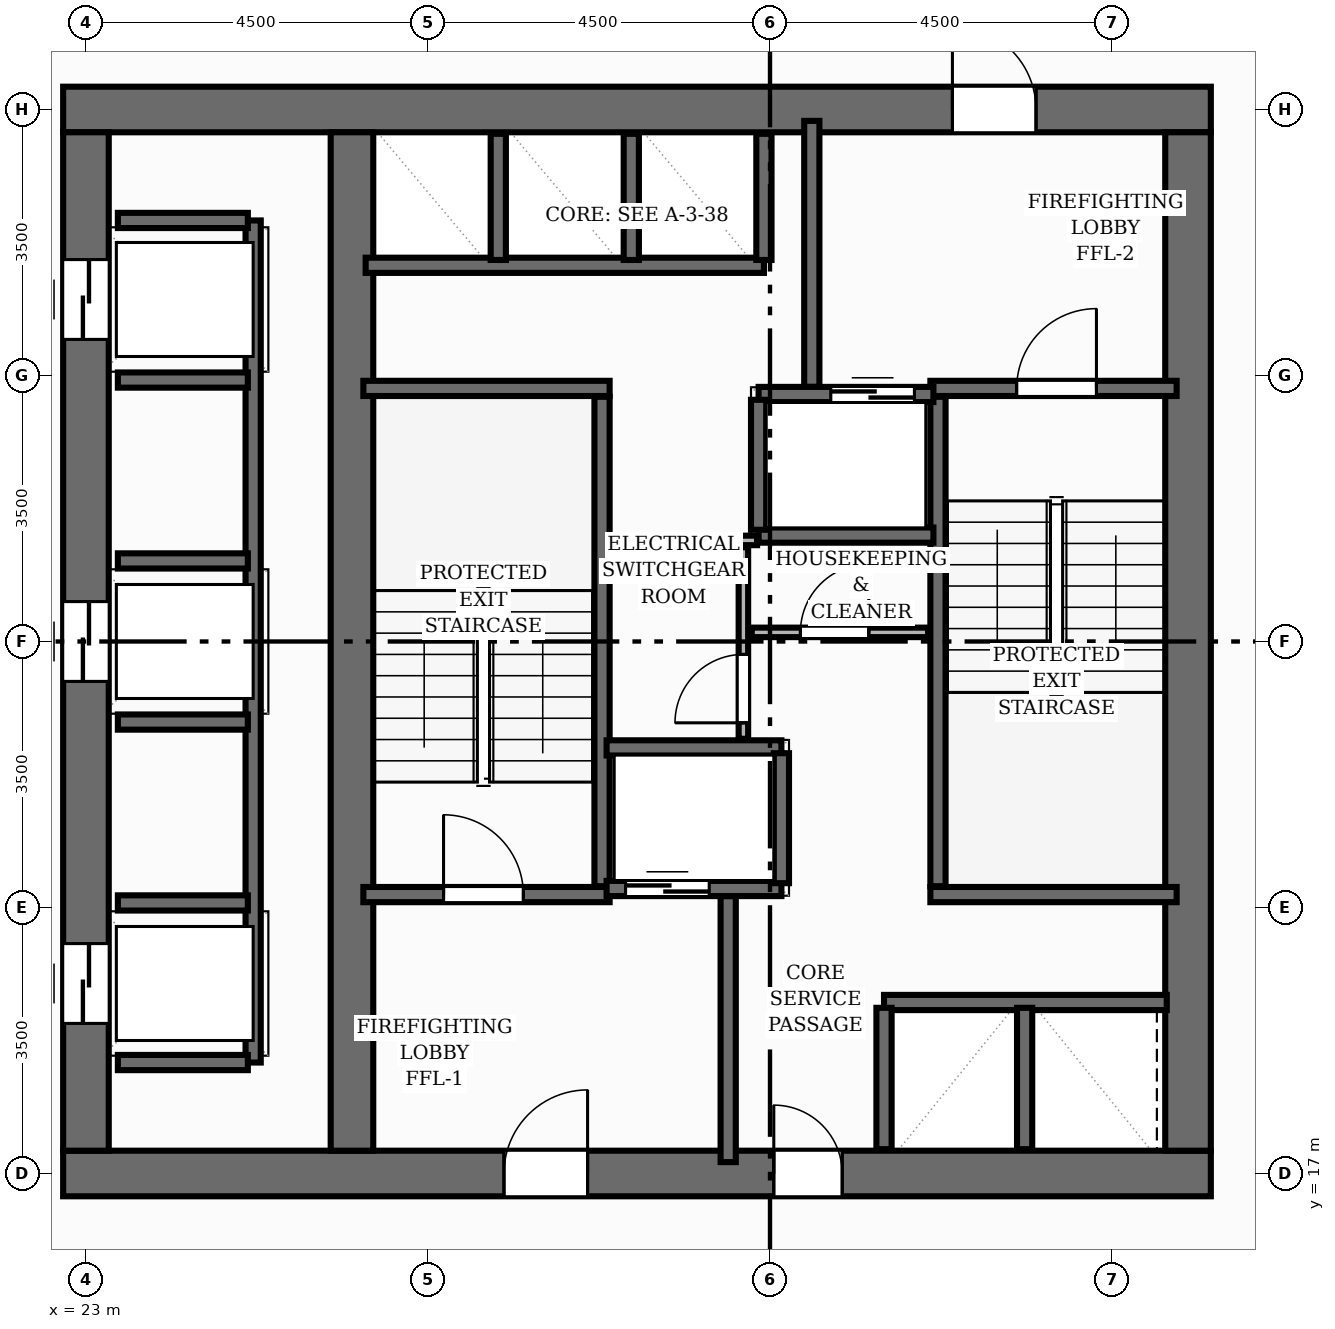
"""IFC4 building model, lengths in metres.
Left out: names, types, materials, properties, quantities, classifications, styles, units other than length and angle.
Written with IfcOpenShell. Run it as: python <this file> out.ifc"""

import sys

from ifc_helpers import new_model, si_unit, direction, frame, frame_2d, origin, place, context, subcontext, project, spatial, rectangle, extrude, element, fill, save


model = new_model("IFC4")
c1 = context("Model", 3, precision=1e-05, world=origin(), true_north=direction((0.0, 1.0)))
c2 = subcontext(c1, "Body", "Model", "MODEL_VIEW")
j1 = project(units=[si_unit("LENGTHUNIT", "METRE"), si_unit("PLANEANGLEUNIT", "RADIAN")], contexts=[c1])
p1 = place(None, origin())
s1 = spatial("IfcSite", under=j1, at=p1, CompositionType="ELEMENT")
p2 = place(p1, origin())
s2 = spatial("IfcBuilding", under=s1, at=p2, CompositionType="ELEMENT")
p3 = place(p2, frame((0.0, 0.0, 155.36)))
s3 = spatial("IfcBuildingStorey", under=s2, at=p3, CompositionType="ELEMENT", Elevation=155.36)
p4 = place(p3, frame((22.7, 17.0, 0.0), z_axis=(0.0, 0.0, 1.0), x_axis=(1.0, 0.0, 0.0)))
e1 = element("IfcWall", 1, at=p4, inside=s3, PredefinedType="SHEAR", context=c2, shape_type="SweptSolid", body=[
    extrude(rectangle(XDim=15.1, YDim=0.6, at=frame_2d((7.55, 0.0))), origin(), (0.0, 0.0, 1.0), 3.2),
])
p5 = place(p4, frame((5.8, 0.0, 0.0)))
e2 = element("IfcOpeningElement", 2, at=p5, cuts=e1, PredefinedType="OPENING", context=c2, shape_type="SweptSolid", body=[
    extrude(rectangle(XDim=1.1, YDim=2.15, at=frame_2d((0.55, 1.075))), frame((0.0, 0.31, 0.0), z_axis=(0.0, -1.0, 0.0), x_axis=(1.0, 0.0, 0.0)), (0.0, 0.0, 1.0), 0.62),
])
p6 = place(p4, frame((9.35, 0.0, 0.0)))
e3 = element("IfcOpeningElement", 3, at=p6, cuts=e1, PredefinedType="OPENING", context=c2, shape_type="SweptSolid", body=[
    extrude(rectangle(XDim=0.9, YDim=2.1, at=frame_2d((0.45, 1.05))), frame((0.0, 0.31, 0.0), z_axis=(0.0, -1.0, 0.0), x_axis=(1.0, 0.0, 0.0)), (0.0, 0.0, 1.0), 0.62),
])
p7 = place(p3, frame((22.7, 31.0, 0.0), z_axis=(0.0, 0.0, 1.0), x_axis=(1.0, 0.0, 0.0)))
e4 = element("IfcWall", 4, at=p7, inside=s3, PredefinedType="SHEAR", context=c2, shape_type="SweptSolid", body=[
    extrude(rectangle(XDim=15.1, YDim=0.6, at=frame_2d((7.55, 0.0))), origin(), (0.0, 0.0, 1.0), 3.2),
])
p8 = place(p7, frame((11.7, 0.0, 0.0)))
e5 = element("IfcOpeningElement", 5, at=p8, cuts=e4, PredefinedType="OPENING", context=c2, shape_type="SweptSolid", body=[
    extrude(rectangle(XDim=1.1, YDim=2.15, at=frame_2d((0.55, 1.075))), frame((0.0, 0.31, 0.0), z_axis=(0.0, -1.0, 0.0), x_axis=(1.0, 0.0, 0.0)), (0.0, 0.0, 1.0), 0.62),
])
p9 = place(p3, frame((23.0, 17.3, 0.0), z_axis=(0.0, 0.0, 1.0), x_axis=(0.0, 1.0, 0.0)))
e6 = element("IfcWall", 6, at=p9, inside=s3, PredefinedType="SHEAR", context=c2, shape_type="SweptSolid", body=[
    extrude(rectangle(XDim=13.4, YDim=0.6, at=frame_2d((6.7, 0.0))), origin(), (0.0, 0.0, 1.0), 3.2),
])
p10 = place(p9, frame((1.675, 0.0, 0.0)))
e7 = element("IfcOpeningElement", 7, at=p10, cuts=e6, PredefinedType="OPENING", context=c2, shape_type="SweptSolid", body=[
    extrude(rectangle(XDim=1.05, YDim=2.15, at=frame_2d((0.525, 1.075))), frame((0.0, 0.31, 0.0), z_axis=(0.0, -1.0, 0.0), x_axis=(1.0, 0.0, 0.0)), (0.0, 0.0, 1.0), 0.62),
])
p11 = place(p9, frame((6.175, 0.0, 0.0)))
e8 = element("IfcOpeningElement", 8, at=p11, cuts=e6, PredefinedType="OPENING", context=c2, shape_type="SweptSolid", body=[
    extrude(rectangle(XDim=1.05, YDim=2.15, at=frame_2d((0.525, 1.075))), frame((0.0, 0.31, 0.0), z_axis=(0.0, -1.0, 0.0), x_axis=(1.0, 0.0, 0.0)), (0.0, 0.0, 1.0), 0.62),
])
p12 = place(p9, frame((10.675, 0.0, 0.0)))
e9 = element("IfcOpeningElement", 9, at=p12, cuts=e6, PredefinedType="OPENING", context=c2, shape_type="SweptSolid", body=[
    extrude(rectangle(XDim=1.05, YDim=2.15, at=frame_2d((0.525, 1.075))), frame((0.0, 0.31, 0.0), z_axis=(0.0, -1.0, 0.0), x_axis=(1.0, 0.0, 0.0)), (0.0, 0.0, 1.0), 0.62),
])
p13 = place(p3, frame((37.5, 17.3, 0.0), z_axis=(0.0, 0.0, 1.0), x_axis=(0.0, 1.0, 0.0)))
e10 = element("IfcWall", 10, at=p13, inside=s3, PredefinedType="SHEAR", context=c2, shape_type="SweptSolid", body=[
    extrude(rectangle(XDim=13.4, YDim=0.6, at=frame_2d((6.7, 0.0))), origin(), (0.0, 0.0, 1.0), 3.2),
])
p14 = place(p3, frame((26.5, 17.3, 0.0), z_axis=(0.0, 0.0, 1.0), x_axis=(0.0, 1.0, 0.0)))
e11 = element("IfcWall", 11, at=p14, inside=s3, PredefinedType="SHEAR", context=c2, shape_type="SweptSolid", body=[
    extrude(rectangle(XDim=13.4, YDim=0.56, at=frame_2d((6.7, 0.0))), origin(), (0.0, 0.0, 1.0), 3.2),
])
p15 = place(p3, frame((29.79, 20.78, 0.0), z_axis=(0.0, 0.0, 1.0), x_axis=(0.0, 1.0, 0.0)))
e12 = element("IfcWall", 12, at=p15, inside=s3, PredefinedType="SHEAR", context=c2, shape_type="SweptSolid", body=[
    extrude(rectangle(XDim=6.44, YDim=0.2, at=frame_2d((3.22, 0.0))), origin(), (0.0, 0.0, 1.0), 3.2),
])
p16 = place(p3, frame((26.65, 27.33, 0.0), z_axis=(0.0, 0.0, 1.0), x_axis=(1.0, 0.0, 0.0)))
e13 = element("IfcWall", 13, at=p16, inside=s3, PredefinedType="SHEAR", context=c2, shape_type="SweptSolid", body=[
    extrude(rectangle(XDim=3.24, YDim=0.2, at=frame_2d((1.62, 0.0))), origin(), (0.0, 0.0, 1.0), 3.2),
])
p17 = place(p3, frame((26.65, 20.67, 0.0), z_axis=(0.0, 0.0, 1.0), x_axis=(1.0, 0.0, 0.0)))
e14 = element("IfcWall", 14, at=p17, inside=s3, PredefinedType="SHEAR", context=c2, shape_type="SweptSolid", body=[
    extrude(rectangle(XDim=3.24, YDim=0.2, at=frame_2d((1.62, 0.0))), origin(), (0.0, 0.0, 1.0), 3.2),
])
p18 = place(p17, frame((1.055, 0.0, 0.0)))
e15 = element("IfcOpeningElement", 15, at=p18, cuts=e14, PredefinedType="OPENING", context=c2, shape_type="SweptSolid", body=[
    extrude(rectangle(XDim=1.05, YDim=2.15, at=frame_2d((0.525, 1.075))), frame((0.0, 0.11, 0.0), z_axis=(0.0, -1.0, 0.0), x_axis=(1.0, 0.0, 0.0)), (0.0, 0.0, 1.0), 0.22),
])
p19 = place(p3, frame((34.21, 20.78, 0.0), z_axis=(0.0, 0.0, 1.0), x_axis=(0.0, 1.0, 0.0)))
e16 = element("IfcWall", 16, at=p19, inside=s3, PredefinedType="SHEAR", context=c2, shape_type="SweptSolid", body=[
    extrude(rectangle(XDim=6.44, YDim=0.2, at=frame_2d((3.22, 0.0))), origin(), (0.0, 0.0, 1.0), 3.2),
])
p20 = place(p3, frame((34.11, 20.67, 0.0), z_axis=(0.0, 0.0, 1.0), x_axis=(1.0, 0.0, 0.0)))
e17 = element("IfcWall", 17, at=p20, inside=s3, PredefinedType="SHEAR", context=c2, shape_type="SweptSolid", body=[
    extrude(rectangle(XDim=3.24, YDim=0.2, at=frame_2d((1.62, 0.0))), origin(), (0.0, 0.0, 1.0), 3.2),
])
p21 = place(p3, frame((34.11, 27.33, 0.0), z_axis=(0.0, 0.0, 1.0), x_axis=(1.0, 0.0, 0.0)))
e18 = element("IfcWall", 18, at=p21, inside=s3, PredefinedType="SHEAR", context=c2, shape_type="SweptSolid", body=[
    extrude(rectangle(XDim=3.24, YDim=0.2, at=frame_2d((1.62, 0.0))), origin(), (0.0, 0.0, 1.0), 3.2),
])
p22 = place(p21, frame((1.135, 0.0, 0.0)))
e19 = element("IfcOpeningElement", 19, at=p22, cuts=e18, PredefinedType="OPENING", context=c2, shape_type="SweptSolid", body=[
    extrude(rectangle(XDim=1.05, YDim=2.15, at=frame_2d((0.525, 1.075))), frame((0.0, 0.11, 0.0), z_axis=(0.0, -1.0, 0.0), x_axis=(1.0, 0.0, 0.0)), (0.0, 0.0, 1.0), 0.22),
])
for number, where, z_axis, x_axis in (
    (20, (31.45, 17.15, 0.0), (0.0, 0.0, 1.0), (0.0, 1.0, 0.0)),
    (21, (32.55, 27.35, 0.0), (0.0, 0.0, 1.0), (0.0, 1.0, 0.0)),
):
    element("IfcWall", number, at=place(p3, frame(where, z_axis=z_axis, x_axis=x_axis)), inside=s3, PredefinedType="SHEAR", context=c2, shape_type="SweptSolid", body=[
        extrude(rectangle(XDim=3.5, YDim=0.2, at=frame_2d((1.75, 0.0))), origin(), (0.0, 0.0, 1.0), 3.2),
    ])
p23 = place(p3, frame((29.85, 20.75, 0.0), z_axis=(0.0, 0.0, 1.0), x_axis=(1.0, 0.0, 0.0)))
e22 = element("IfcWall", 22, at=p23, inside=s3, PredefinedType="SHEAR", context=c2, shape_type="SweptSolid", body=[
    extrude(rectangle(XDim=2.3, YDim=0.2, at=frame_2d((1.15, 0.0))), origin(), (0.0, 0.0, 1.0), 3.2),
])
p24 = place(p23, frame((0.25, 0.0, 0.0)))
e23 = element("IfcOpeningElement", 23, at=p24, cuts=e22, PredefinedType="OPENING", context=c2, shape_type="SweptSolid", body=[
    extrude(rectangle(XDim=1.1, YDim=2.15, at=frame_2d((0.55, 1.075))), frame((0.0, 0.11, 0.0), z_axis=(0.0, -1.0, 0.0), x_axis=(1.0, 0.0, 0.0)), (0.0, 0.0, 1.0), 0.22),
])
p25 = place(p3, frame((29.85, 22.6, 0.0), z_axis=(0.0, 0.0, 1.0), x_axis=(1.0, 0.0, 0.0)))
e24 = element("IfcWall", 24, at=p25, inside=s3, PredefinedType="SHEAR", context=c2, shape_type="SweptSolid", body=[
    extrude(rectangle(XDim=2.3, YDim=0.2, at=frame_2d((1.15, 0.0))), origin(), (0.0, 0.0, 1.0), 3.2),
])
p26 = place(p3, frame((32.15, 20.82, 0.0), z_axis=(0.0, 0.0, 1.0), x_axis=(0.0, 1.0, 0.0)))
e25 = element("IfcWall", 25, at=p26, inside=s3, PredefinedType="SHEAR", context=c2, shape_type="SweptSolid", body=[
    extrude(rectangle(XDim=1.71, YDim=0.2, at=frame_2d((0.855, 0.0))), origin(), (0.0, 0.0, 1.0), 3.2),
])
p27 = place(p3, frame((31.85, 27.25, 0.0), z_axis=(0.0, 0.0, 1.0), x_axis=(1.0, 0.0, 0.0)))
e26 = element("IfcWall", 26, at=p27, inside=s3, PredefinedType="SHEAR", context=c2, shape_type="SweptSolid", body=[
    extrude(rectangle(XDim=2.3, YDim=0.2, at=frame_2d((1.15, 0.0))), origin(), (0.0, 0.0, 1.0), 3.2),
])
p28 = place(p27, frame((0.95, 0.0, 0.0)))
e27 = element("IfcOpeningElement", 27, at=p28, cuts=e26, PredefinedType="OPENING", context=c2, shape_type="SweptSolid", body=[
    extrude(rectangle(XDim=1.1, YDim=2.15, at=frame_2d((0.55, 1.075))), frame((0.0, 0.11, 0.0), z_axis=(0.0, -1.0, 0.0), x_axis=(1.0, 0.0, 0.0)), (0.0, 0.0, 1.0), 0.22),
])
p29 = place(p3, frame((31.85, 25.4, 0.0), z_axis=(0.0, 0.0, 1.0), x_axis=(1.0, 0.0, 0.0)))
e28 = element("IfcWall", 28, at=p29, inside=s3, PredefinedType="SHEAR", context=c2, shape_type="SweptSolid", body=[
    extrude(rectangle(XDim=2.3, YDim=0.2, at=frame_2d((1.15, 0.0))), origin(), (0.0, 0.0, 1.0), 3.2),
])
p30 = place(p3, frame((31.85, 25.47, 0.0), z_axis=(0.0, 0.0, 1.0), x_axis=(0.0, 1.0, 0.0)))
e29 = element("IfcWall", 29, at=p30, inside=s3, PredefinedType="SHEAR", context=c2, shape_type="SweptSolid", body=[
    extrude(rectangle(XDim=1.71, YDim=0.2, at=frame_2d((0.855, 0.0))), origin(), (0.0, 0.0, 1.0), 3.2),
])
p31 = place(p3, frame((25.2, 18.46, 0.0), z_axis=(0.0, 0.0, 1.0), x_axis=(0.0, 1.0, 0.0)))
e30 = element("IfcWall", 30, at=p31, inside=s3, PredefinedType="SHEAR", context=c2, shape_type="SweptSolid", body=[
    extrude(rectangle(XDim=11.08, YDim=0.2, at=frame_2d((5.54, 0.0))), origin(), (0.0, 0.0, 1.0), 3.2),
])
for number, where, z_axis, x_axis in (
    (31, (23.42, 18.46, 0.0), (0.0, 0.0, 1.0), (1.0, 0.0, 0.0)),
    (32, (23.42, 29.54, 0.0), (0.0, 0.0, 1.0), (1.0, 0.0, 0.0)),
    (33, (23.42, 20.56, 0.0), (0.0, 0.0, 1.0), (1.0, 0.0, 0.0)),
    (34, (23.42, 22.94, 0.0), (0.0, 0.0, 1.0), (1.0, 0.0, 0.0)),
    (35, (23.42, 25.06, 0.0), (0.0, 0.0, 1.0), (1.0, 0.0, 0.0)),
    (36, (23.42, 27.44, 0.0), (0.0, 0.0, 1.0), (1.0, 0.0, 0.0)),
):
    element("IfcWall", number, at=place(p3, frame(where, z_axis=z_axis, x_axis=x_axis)), inside=s3, PredefinedType="SHEAR", context=c2, shape_type="SweptSolid", body=[
        extrude(rectangle(XDim=1.71, YDim=0.2, at=frame_2d((0.855, 0.0))), origin(), (0.0, 0.0, 1.0), 3.2),
    ])
p32 = place(p3, frame((26.68, 28.95, 0.0), z_axis=(0.0, 0.0, 1.0), x_axis=(1.0, 0.0, 0.0)))
e37 = element("IfcWall", 37, at=p32, inside=s3, PredefinedType="SHEAR", context=c2, shape_type="SweptSolid", body=[
    extrude(rectangle(XDim=5.24, YDim=0.2, at=frame_2d((2.62, 0.0))), origin(), (0.0, 0.0, 1.0), 3.2),
])
for number, where, z_axis, x_axis in (
    (38, (31.92, 29.02, 0.0), (0.0, 0.0, 1.0), (0.0, 1.0, 0.0)),
    (39, (28.425, 29.02, 0.0), (0.0, 0.0, 1.0), (0.0, 1.0, 0.0)),
    (40, (30.175, 29.02, 0.0), (0.0, 0.0, 1.0), (0.0, 1.0, 0.0)),
):
    element("IfcWall", number, at=place(p3, frame(where, z_axis=z_axis, x_axis=x_axis)), inside=s3, PredefinedType="SHEAR", context=c2, shape_type="SweptSolid", body=[
        extrude(rectangle(XDim=1.66, YDim=0.2, at=frame_2d((0.83, 0.0))), origin(), (0.0, 0.0, 1.0), 3.2),
    ])
p33 = place(p3, frame((33.5, 19.25, 0.0), z_axis=(0.0, 0.0, 1.0), x_axis=(1.0, 0.0, 0.0)))
e41 = element("IfcWall", 41, at=p33, inside=s3, PredefinedType="SHEAR", context=c2, shape_type="SweptSolid", body=[
    extrude(rectangle(XDim=3.72, YDim=0.2, at=frame_2d((1.86, 0.0))), origin(), (0.0, 0.0, 1.0), 3.2),
])
for number, where, z_axis, x_axis in (
    (42, (33.5, 17.32, 0.0), (0.0, 0.0, 1.0), (0.0, 1.0, 0.0)),
    (43, (35.35, 17.32, 0.0), (0.0, 0.0, 1.0), (0.0, 1.0, 0.0)),
):
    element("IfcWall", number, at=place(p3, frame(where, z_axis=z_axis, x_axis=x_axis)), inside=s3, PredefinedType="SHEAR", context=c2, shape_type="SweptSolid", body=[
        extrude(rectangle(XDim=1.86, YDim=0.2, at=frame_2d((0.93, 0.0))), origin(), (0.0, 0.0, 1.0), 3.2),
    ])
p34 = place(p3, frame((31.65, 22.72, 0.0), z_axis=(0.0, 0.0, 1.0), x_axis=(0.0, 1.0, 0.0)))
e44 = element("IfcWall", 44, at=p34, inside=s3, PredefinedType="PARTITIONING", context=c2, shape_type="SweptSolid", body=[
    extrude(rectangle(XDim=2.52, YDim=0.125, at=frame_2d((1.26, 0.0))), origin(), (0.0, 0.0, 1.0), 2.795),
])
p35 = place(p34, frame((0.21, 0.0, 0.0)))
e45 = element("IfcOpeningElement", 45, at=p35, cuts=e44, PredefinedType="OPENING", context=c2, shape_type="SweptSolid", body=[
    extrude(rectangle(XDim=0.9, YDim=2.1, at=frame_2d((0.45, 1.05))), frame((0.0, 0.073, 0.0), z_axis=(0.0, -1.0, 0.0), x_axis=(1.0, 0.0, 0.0)), (0.0, 0.0, 1.0), 0.145),
])
p36 = place(p3, frame((31.76, 24.12, 0.0), z_axis=(0.0, 0.0, 1.0), x_axis=(1.0, 0.0, 0.0)))
e46 = element("IfcWall", 46, at=p36, inside=s3, PredefinedType="PARTITIONING", context=c2, shape_type="SweptSolid", body=[
    extrude(rectangle(XDim=2.32, YDim=0.125, at=frame_2d((1.16, 0.0))), origin(), (0.0, 0.0, 1.0), 2.795),
])
p37 = place(p36, frame((0.64, 0.0, 0.0)))
e47 = element("IfcOpeningElement", 47, at=p37, cuts=e46, PredefinedType="OPENING", context=c2, shape_type="SweptSolid", body=[
    extrude(rectangle(XDim=0.9, YDim=2.1, at=frame_2d((0.45, 1.05))), frame((0.0, 0.073, 0.0), z_axis=(0.0, -1.0, 0.0), x_axis=(1.0, 0.0, 0.0)), (0.0, 0.0, 1.0), 0.145),
])
p38 = place(p3, frame((29.89, 25.33, 0.0), z_axis=(0.0, 0.0, 1.0), x_axis=(1.0, 0.0, 0.0)))
e48 = element("IfcWall", 48, at=p38, inside=s3, PredefinedType="PARTITIONING", context=c2, shape_type="SweptSolid", body=[
    extrude(rectangle(XDim=1.94, YDim=0.125, at=frame_2d((0.97, 0.0))), origin(), (0.0, 0.0, 1.0), 2.795),
])
p39 = place(p3, frame((44.336, 20.497, 0.0), z_axis=(0.0, 0.0, 1.0), x_axis=(-0.696857448942, -0.717209659621, 0.0)))
e49 = element("IfcWall", 49, at=p39, inside=s3, PredefinedType="PARTITIONING", context=c2, shape_type="SweptSolid", body=[
    extrude(rectangle(XDim=13.052, YDim=0.125, at=frame_2d((6.526, 0.0))), origin(), (0.0, 0.0, 1.0), 2.251),
])
p40 = place(p39, frame((5.516, 0.0, 0.0)))
e50 = element("IfcOpeningElement", 50, at=p40, cuts=e49, PredefinedType="OPENING", context=c2, shape_type="SweptSolid", body=[
    extrude(rectangle(XDim=0.9, YDim=2.1, at=frame_2d((0.45, 1.05))), frame((0.0, 0.073, 0.0), z_axis=(0.0, -1.0, 0.0), x_axis=(1.0, 0.0, 0.0)), (0.0, 0.0, 1.0), 0.145),
])
p41 = place(p18, origin())
e51 = element("IfcDoor", 51, at=p41, inside=s3, OperationType="SINGLE_SWING_LEFT", PredefinedType="DOOR", context=c2, shape_type="SweptSolid", body=[
    extrude(rectangle(XDim=1.05, YDim=2.15, at=frame_2d((0.525, 1.075))), frame((0.0, 0.025, 0.0), z_axis=(0.0, -1.0, 0.0), x_axis=(1.0, 0.0, 0.0)), (0.0, 0.0, 1.0), 0.05),
])
fill(e15, e51)
p42 = place(p22, origin())
e52 = element("IfcDoor", 52, at=p42, inside=s3, OperationType="SINGLE_SWING_RIGHT", PredefinedType="DOOR", context=c2, shape_type="SweptSolid", body=[
    extrude(rectangle(XDim=1.05, YDim=2.15, at=frame_2d((0.525, 1.075))), frame((0.0, 0.025, 0.0), z_axis=(0.0, -1.0, 0.0), x_axis=(1.0, 0.0, 0.0)), (0.0, 0.0, 1.0), 0.05),
])
fill(e19, e52)
p43 = place(p5, origin())
e53 = element("IfcDoor", 53, at=p43, inside=s3, OperationType="SINGLE_SWING_RIGHT", PredefinedType="DOOR", context=c2, shape_type="SweptSolid", body=[
    extrude(rectangle(XDim=1.1, YDim=2.15, at=frame_2d((0.55, 1.075))), frame((0.0, 0.025, 0.0), z_axis=(0.0, -1.0, 0.0), x_axis=(1.0, 0.0, 0.0)), (0.0, 0.0, 1.0), 0.05),
])
fill(e2, e53)
p44 = place(p8, origin())
e54 = element("IfcDoor", 54, at=p44, inside=s3, OperationType="SINGLE_SWING_LEFT", PredefinedType="DOOR", context=c2, shape_type="SweptSolid", body=[
    extrude(rectangle(XDim=1.1, YDim=2.15, at=frame_2d((0.55, 1.075))), frame((0.0, 0.025, 0.0), z_axis=(0.0, -1.0, 0.0), x_axis=(1.0, 0.0, 0.0)), (0.0, 0.0, 1.0), 0.05),
])
fill(e5, e54)
p45 = place(p24, origin())
e55 = element("IfcDoor", 55, at=p45, inside=s3, OperationType="DOUBLE_DOOR_SLIDING", PredefinedType="DOOR", context=c2, shape_type="SweptSolid", body=[
    extrude(rectangle(XDim=1.1, YDim=2.15, at=frame_2d((0.55, 1.075))), frame((0.0, 0.025, 0.0), z_axis=(0.0, -1.0, 0.0), x_axis=(1.0, 0.0, 0.0)), (0.0, 0.0, 1.0), 0.05),
])
fill(e23, e55)
p46 = place(p28, origin())
e56 = element("IfcDoor", 56, at=p46, inside=s3, OperationType="DOUBLE_DOOR_SLIDING", PredefinedType="DOOR", context=c2, shape_type="SweptSolid", body=[
    extrude(rectangle(XDim=1.1, YDim=2.15, at=frame_2d((0.55, 1.075))), frame((0.0, 0.025, 0.0), z_axis=(0.0, -1.0, 0.0), x_axis=(1.0, 0.0, 0.0)), (0.0, 0.0, 1.0), 0.05),
])
fill(e27, e56)
p47 = place(p10, origin())
e57 = element("IfcDoor", 57, at=p47, inside=s3, OperationType="DOUBLE_DOOR_SLIDING", PredefinedType="DOOR", context=c2, shape_type="SweptSolid", body=[
    extrude(rectangle(XDim=1.05, YDim=2.15, at=frame_2d((0.525, 1.075))), frame((0.0, 0.025, 0.0), z_axis=(0.0, -1.0, 0.0), x_axis=(1.0, 0.0, 0.0)), (0.0, 0.0, 1.0), 0.05),
])
fill(e7, e57)
p48 = place(p11, origin())
e58 = element("IfcDoor", 58, at=p48, inside=s3, OperationType="DOUBLE_DOOR_SLIDING", PredefinedType="DOOR", context=c2, shape_type="SweptSolid", body=[
    extrude(rectangle(XDim=1.05, YDim=2.15, at=frame_2d((0.525, 1.075))), frame((0.0, 0.025, 0.0), z_axis=(0.0, -1.0, 0.0), x_axis=(1.0, 0.0, 0.0)), (0.0, 0.0, 1.0), 0.05),
])
fill(e8, e58)
p49 = place(p12, origin())
e59 = element("IfcDoor", 59, at=p49, inside=s3, OperationType="DOUBLE_DOOR_SLIDING", PredefinedType="DOOR", context=c2, shape_type="SweptSolid", body=[
    extrude(rectangle(XDim=1.05, YDim=2.15, at=frame_2d((0.525, 1.075))), frame((0.0, 0.025, 0.0), z_axis=(0.0, -1.0, 0.0), x_axis=(1.0, 0.0, 0.0)), (0.0, 0.0, 1.0), 0.05),
])
fill(e9, e59)
p50 = place(p6, origin())
e60 = element("IfcDoor", 60, at=p50, inside=s3, OperationType="SINGLE_SWING_LEFT", PredefinedType="DOOR", context=c2, shape_type="SweptSolid", body=[
    extrude(rectangle(XDim=0.9, YDim=2.1, at=frame_2d((0.45, 1.05))), frame((0.0, 0.025, 0.0), z_axis=(0.0, -1.0, 0.0), x_axis=(1.0, 0.0, 0.0)), (0.0, 0.0, 1.0), 0.05),
])
fill(e3, e60)
p51 = place(p35, origin())
e61 = element("IfcDoor", 61, at=p51, inside=s3, OperationType="SINGLE_SWING_LEFT", PredefinedType="DOOR", context=c2, shape_type="SweptSolid", body=[
    extrude(rectangle(XDim=0.9, YDim=2.1, at=frame_2d((0.45, 1.05))), frame((0.0, 0.025, 0.0), z_axis=(0.0, -1.0, 0.0), x_axis=(1.0, 0.0, 0.0)), (0.0, 0.0, 1.0), 0.05),
])
fill(e45, e61)
p52 = place(p37, origin())
e62 = element("IfcDoor", 62, at=p52, inside=s3, OperationType="SINGLE_SWING_RIGHT", PredefinedType="DOOR", context=c2, shape_type="SweptSolid", body=[
    extrude(rectangle(XDim=0.9, YDim=2.1, at=frame_2d((0.45, 1.05))), frame((0.0, 0.025, 0.0), z_axis=(0.0, -1.0, 0.0), x_axis=(1.0, 0.0, 0.0)), (0.0, 0.0, 1.0), 0.05),
])
fill(e47, e62)
save(model, sys.argv[1])
